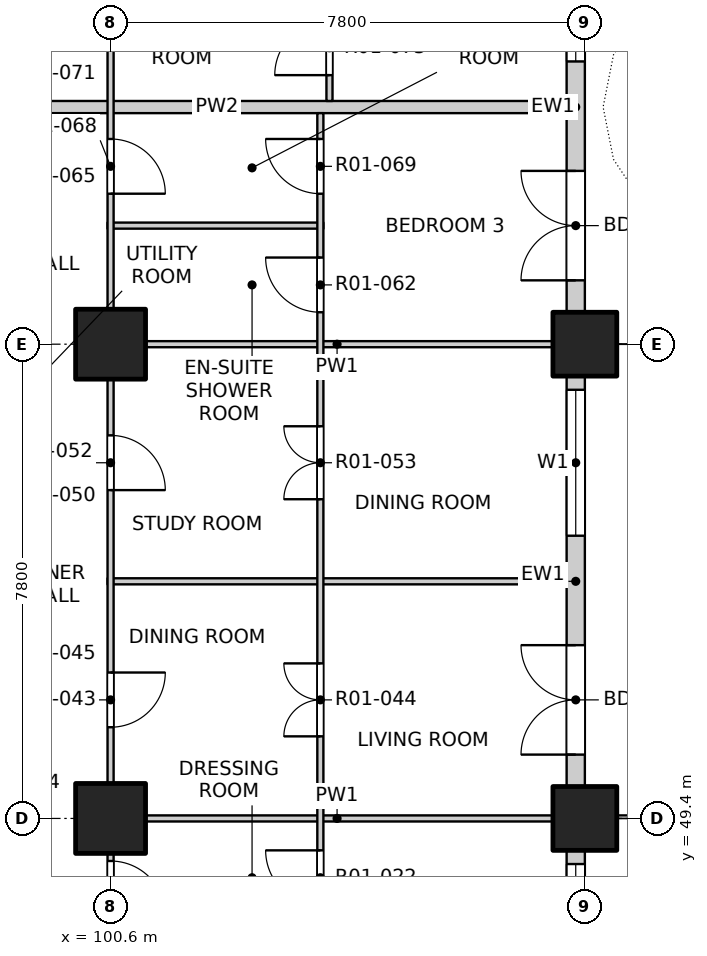
"""IFC4 building model, lengths in metres.
Left out: names, types, materials, properties, quantities, classifications, styles, units other than length and angle.
Written with IfcOpenShell. Run it as: python <this file> out.ifc"""

import sys

from ifc_helpers import new_model, si_unit, direction, frame, frame_2d, origin, origin_2d, place, context, subcontext, project, spatial, rectangle, extrude, element, fill, save


model = new_model("IFC4")
c1 = context("Model", 3, precision=1e-05, world=origin(), true_north=direction((0.0, 1.0)))
c2 = subcontext(c1, "Body", "Model", "MODEL_VIEW")
j1 = project(units=[si_unit("LENGTHUNIT", "METRE"), si_unit("PLANEANGLEUNIT", "RADIAN")], contexts=[c1])
p1 = place(None, origin())
s1 = spatial("IfcSite", under=j1, at=p1, CompositionType="ELEMENT")
p2 = place(p1, origin())
s2 = spatial("IfcBuilding", under=s1, at=p2, CompositionType="ELEMENT")
p3 = place(p2, frame((0.0, 0.0, 26.3)))
s3 = spatial("IfcBuildingStorey", under=s2, at=p3, CompositionType="ELEMENT", Elevation=26.3)
for number, where, z_axis, x_axis in (
    (1, (108.4, 49.4, -0.25), (0.0, 0.0, 1.0), (1.0, 0.0, 0.0)),
    (2, (108.4, 57.2, -0.25), (0.0, 0.0, 1.0), (1.0, 0.0, 0.0)),
):
    element("IfcColumn", number, at=place(p3, frame(where, z_axis=z_axis, x_axis=x_axis)), inside=s3, PredefinedType="COLUMN", context=c2, shape_type="SweptSolid", body=[
        extrude(rectangle(XDim=1.05, YDim=1.05, at=origin_2d()), origin(), (0.0, 0.0, 1.0), 3.4),
    ])
for number, where, z_axis, x_axis in (
    (3, (100.6, 49.4, -0.25), (0.0, 0.0, 1.0), (1.0, 0.0, 0.0)),
    (4, (100.6, 57.2, -0.25), (0.0, 0.0, 1.0), (1.0, 0.0, 0.0)),
):
    element("IfcColumn", number, at=place(p3, frame(where, z_axis=z_axis, x_axis=x_axis)), inside=s3, PredefinedType="COLUMN", context=c2, shape_type="SweptSolid", body=[
        extrude(rectangle(XDim=1.15, YDim=1.15, at=origin_2d()), origin(), (0.0, 0.0, 1.0), 3.4),
    ])
p4 = place(p3, frame((108.25, 45.5, 0.0), z_axis=(0.0, 0.0, 1.0), x_axis=(0.0, 1.0, 0.0)))
e5 = element("IfcWall", 5, at=p4, inside=s3, PredefinedType="SOLIDWALL", context=c2, shape_type="SweptSolid", body=[
    extrude(rectangle(XDim=3.375, YDim=0.3, at=frame_2d((1.688, 0.0))), origin(), (0.0, 0.0, 1.0), 2.7),
])
p5 = place(p4, frame((0.75, 0.0, 0.9)))
e6 = element("IfcOpeningElement", 6, at=p5, cuts=e5, PredefinedType="OPENING", context=c2, shape_type="SweptSolid", body=[
    extrude(rectangle(XDim=2.4, YDim=1.8, at=frame_2d((1.2, 0.9))), frame((0.0, 0.16, 0.0), z_axis=(0.0, -1.0, 0.0), x_axis=(1.0, 0.0, 0.0)), (0.0, 0.0, 1.0), 0.32),
])
p6 = place(p3, frame((108.25, 49.925, 0.0), z_axis=(0.0, 0.0, 1.0), x_axis=(0.0, 1.0, 0.0)))
e7 = element("IfcWall", 7, at=p6, inside=s3, PredefinedType="SOLIDWALL", context=c2, shape_type="SweptSolid", body=[
    extrude(rectangle(XDim=6.75, YDim=0.3, at=frame_2d((3.375, 0.0))), origin(), (0.0, 0.0, 1.0), 2.7),
])
p7 = place(p6, frame((0.525, 0.0, 0.0)))
e8 = element("IfcOpeningElement", 8, at=p7, cuts=e7, PredefinedType="OPENING", context=c2, shape_type="SweptSolid", body=[
    extrude(rectangle(XDim=1.8, YDim=2.4, at=frame_2d((0.9, 1.2))), frame((0.0, 0.16, 0.0), z_axis=(0.0, -1.0, 0.0), x_axis=(1.0, 0.0, 0.0)), (0.0, 0.0, 1.0), 0.32),
])
p8 = place(p6, frame((4.125, 0.0, 0.9)))
e9 = element("IfcOpeningElement", 9, at=p8, cuts=e7, PredefinedType="OPENING", context=c2, shape_type="SweptSolid", body=[
    extrude(rectangle(XDim=2.4, YDim=1.8, at=frame_2d((1.2, 0.9))), frame((0.0, 0.16, 0.0), z_axis=(0.0, -1.0, 0.0), x_axis=(1.0, 0.0, 0.0)), (0.0, 0.0, 1.0), 0.32),
])
p9 = place(p3, frame((108.25, 57.725, 0.0), z_axis=(0.0, 0.0, 1.0), x_axis=(0.0, 1.0, 0.0)))
e10 = element("IfcWall", 10, at=p9, inside=s3, PredefinedType="SOLIDWALL", context=c2, shape_type="SweptSolid", body=[
    extrude(rectangle(XDim=6.75, YDim=0.3, at=frame_2d((3.375, 0.0))), origin(), (0.0, 0.0, 1.0), 2.7),
])
p10 = place(p9, frame((0.525, 0.0, 0.0)))
e11 = element("IfcOpeningElement", 11, at=p10, cuts=e10, PredefinedType="OPENING", context=c2, shape_type="SweptSolid", body=[
    extrude(rectangle(XDim=1.8, YDim=2.4, at=frame_2d((0.9, 1.2))), frame((0.0, 0.16, 0.0), z_axis=(0.0, -1.0, 0.0), x_axis=(1.0, 0.0, 0.0)), (0.0, 0.0, 1.0), 0.32),
])
p11 = place(p9, frame((4.125, 0.0, 0.9)))
e12 = element("IfcOpeningElement", 12, at=p11, cuts=e10, PredefinedType="OPENING", context=c2, shape_type="SweptSolid", body=[
    extrude(rectangle(XDim=2.4, YDim=1.8, at=frame_2d((1.2, 0.9))), frame((0.0, 0.16, 0.0), z_axis=(0.0, -1.0, 0.0), x_axis=(1.0, 0.0, 0.0)), (0.0, 0.0, 1.0), 0.32),
])
p12 = place(p3, frame((100.55, 49.4, 0.0), z_axis=(0.0, 0.0, 1.0), x_axis=(1.0, 0.0, 0.0)))
e13 = element("IfcWall", 13, at=p12, inside=s3, PredefinedType="PARTITIONING", context=c2, shape_type="SweptSolid", body=[
    extrude(rectangle(XDim=7.55, YDim=0.1, at=frame_2d((3.775, 0.0))), origin(), (0.0, 0.0, 1.0), 2.55),
])
p13 = place(p3, frame((100.55, 53.3, 0.0), z_axis=(0.0, 0.0, 1.0), x_axis=(1.0, 0.0, 0.0)))
e14 = element("IfcWall", 14, at=p13, inside=s3, PredefinedType="PARTITIONING", context=c2, shape_type="SweptSolid", body=[
    extrude(rectangle(XDim=7.55, YDim=0.1, at=frame_2d((3.775, 0.0))), origin(), (0.0, 0.0, 1.0), 3.15),
])
p14 = place(p3, frame((100.55, 57.2, 0.0), z_axis=(0.0, 0.0, 1.0), x_axis=(1.0, 0.0, 0.0)))
e15 = element("IfcWall", 15, at=p14, inside=s3, PredefinedType="PARTITIONING", context=c2, shape_type="SweptSolid", body=[
    extrude(rectangle(XDim=7.55, YDim=0.1, at=frame_2d((3.775, 0.0))), origin(), (0.0, 0.0, 1.0), 2.55),
])
p15 = place(p3, frame((100.55, 59.15, 0.0), z_axis=(0.0, 0.0, 1.0), x_axis=(1.0, 0.0, 0.0)))
e16 = element("IfcWall", 16, at=p15, inside=s3, PredefinedType="PARTITIONING", context=c2, shape_type="SweptSolid", body=[
    extrude(rectangle(XDim=3.55, YDim=0.1, at=frame_2d((1.775, 0.0))), origin(), (0.0, 0.0, 1.0), 3.15),
])
p16 = place(p3, frame((96.6, 61.1, 0.0), z_axis=(0.0, 0.0, 1.0), x_axis=(1.0, 0.0, 0.0)))
e17 = element("IfcWall", 17, at=p16, inside=s3, PredefinedType="PARTITIONING", context=c2, shape_type="SweptSolid", body=[
    extrude(rectangle(XDim=11.5, YDim=0.2, at=frame_2d((5.75, 0.0))), origin(), (0.0, 0.0, 1.0), 3.15),
])
p17 = place(p3, frame((100.6, 41.9, 0.0), z_axis=(0.0, 0.0, 1.0), x_axis=(0.0, 1.0, 0.0)))
e18 = element("IfcWall", 18, at=p17, inside=s3, PredefinedType="PARTITIONING", context=c2, shape_type="SweptSolid", body=[
    extrude(rectangle(XDim=7.5, YDim=0.1, at=frame_2d((3.75, 0.0))), origin(), (0.0, 0.0, 1.0), 2.55),
])
p18 = place(p17, frame((1.2, 0.0, 0.0)))
e19 = element("IfcOpeningElement", 19, at=p18, cuts=e18, PredefinedType="OPENING", context=c2, shape_type="SweptSolid", body=[
    extrude(rectangle(XDim=0.9, YDim=2.1, at=frame_2d((0.45, 1.05))), frame((0.0, 0.06, 0.0), z_axis=(0.0, -1.0, 0.0), x_axis=(1.0, 0.0, 0.0)), (0.0, 0.0, 1.0), 0.12),
])
p19 = place(p17, frame((5.9, 0.0, 0.0)))
e20 = element("IfcOpeningElement", 20, at=p19, cuts=e18, PredefinedType="OPENING", context=c2, shape_type="SweptSolid", body=[
    extrude(rectangle(XDim=0.9, YDim=2.1, at=frame_2d((0.45, 1.05))), frame((0.0, 0.06, 0.0), z_axis=(0.0, -1.0, 0.0), x_axis=(1.0, 0.0, 0.0)), (0.0, 0.0, 1.0), 0.12),
])
p20 = place(p3, frame((100.6, 49.4, 0.0), z_axis=(0.0, 0.0, 1.0), x_axis=(0.0, 1.0, 0.0)))
e21 = element("IfcWall", 21, at=p20, inside=s3, PredefinedType="PARTITIONING", context=c2, shape_type="SweptSolid", body=[
    extrude(rectangle(XDim=31.2, YDim=0.1, at=frame_2d((15.6, 0.0))), origin(), (0.0, 0.0, 1.0), 3.15),
])
p21 = place(p20, frame((1.5, 0.0, 0.0)))
e22 = element("IfcOpeningElement", 22, at=p21, cuts=e21, PredefinedType="OPENING", context=c2, shape_type="SweptSolid", body=[
    extrude(rectangle(XDim=0.9, YDim=2.1, at=frame_2d((0.45, 1.05))), frame((0.0, 0.06, 0.0), z_axis=(0.0, -1.0, 0.0), x_axis=(1.0, 0.0, 0.0)), (0.0, 0.0, 1.0), 0.12),
])
p22 = place(p20, frame((5.4, 0.0, 0.0)))
e23 = element("IfcOpeningElement", 23, at=p22, cuts=e21, PredefinedType="OPENING", context=c2, shape_type="SweptSolid", body=[
    extrude(rectangle(XDim=0.9, YDim=2.1, at=frame_2d((0.45, 1.05))), frame((0.0, 0.06, 0.0), z_axis=(0.0, -1.0, 0.0), x_axis=(1.0, 0.0, 0.0)), (0.0, 0.0, 1.0), 0.12),
])
p23 = place(p20, frame((10.275, 0.0, 0.0)))
e24 = element("IfcOpeningElement", 24, at=p23, cuts=e21, PredefinedType="OPENING", context=c2, shape_type="SweptSolid", body=[
    extrude(rectangle(XDim=0.9, YDim=2.1, at=frame_2d((0.45, 1.05))), frame((0.0, 0.06, 0.0), z_axis=(0.0, -1.0, 0.0), x_axis=(1.0, 0.0, 0.0)), (0.0, 0.0, 1.0), 0.12),
])
p24 = place(p20, frame((14.0, 0.0, 0.0)))
e25 = element("IfcOpeningElement", 25, at=p24, cuts=e21, PredefinedType="OPENING", context=c2, shape_type="SweptSolid", body=[
    extrude(rectangle(XDim=0.9, YDim=2.1, at=frame_2d((0.45, 1.05))), frame((0.0, 0.06, 0.0), z_axis=(0.0, -1.0, 0.0), x_axis=(1.0, 0.0, 0.0)), (0.0, 0.0, 1.0), 0.12),
])
p25 = place(p20, frame((17.1, 0.0, 0.0)))
e26 = element("IfcOpeningElement", 26, at=p25, cuts=e21, PredefinedType="OPENING", context=c2, shape_type="SweptSolid", body=[
    extrude(rectangle(XDim=0.9, YDim=2.1, at=frame_2d((0.45, 1.05))), frame((0.0, 0.06, 0.0), z_axis=(0.0, -1.0, 0.0), x_axis=(1.0, 0.0, 0.0)), (0.0, 0.0, 1.0), 0.12),
])
p26 = place(p20, frame((21.8, 0.0, 0.0)))
e27 = element("IfcOpeningElement", 27, at=p26, cuts=e21, PredefinedType="OPENING", context=c2, shape_type="SweptSolid", body=[
    extrude(rectangle(XDim=0.9, YDim=2.1, at=frame_2d((0.45, 1.05))), frame((0.0, 0.06, 0.0), z_axis=(0.0, -1.0, 0.0), x_axis=(1.0, 0.0, 0.0)), (0.0, 0.0, 1.0), 0.12),
])
p27 = place(p20, frame((24.9, 0.0, 0.0)))
e28 = element("IfcOpeningElement", 28, at=p27, cuts=e21, PredefinedType="OPENING", context=c2, shape_type="SweptSolid", body=[
    extrude(rectangle(XDim=0.9, YDim=2.1, at=frame_2d((0.45, 1.05))), frame((0.0, 0.06, 0.0), z_axis=(0.0, -1.0, 0.0), x_axis=(1.0, 0.0, 0.0)), (0.0, 0.0, 1.0), 0.12),
])
p28 = place(p20, frame((28.8, 0.0, 0.0)))
e29 = element("IfcOpeningElement", 29, at=p28, cuts=e21, PredefinedType="OPENING", context=c2, shape_type="SweptSolid", body=[
    extrude(rectangle(XDim=0.9, YDim=2.1, at=frame_2d((0.45, 1.05))), frame((0.0, 0.06, 0.0), z_axis=(0.0, -1.0, 0.0), x_axis=(1.0, 0.0, 0.0)), (0.0, 0.0, 1.0), 0.12),
])
p29 = place(p3, frame((104.05, 41.9, 0.0), z_axis=(0.0, 0.0, 1.0), x_axis=(0.0, 1.0, 0.0)))
e30 = element("IfcWall", 30, at=p29, inside=s3, PredefinedType="PARTITIONING", context=c2, shape_type="SweptSolid", body=[
    extrude(rectangle(XDim=19.1, YDim=0.1, at=frame_2d((9.55, 0.0))), origin(), (0.0, 0.0, 1.0), 3.15),
])
p30 = place(p29, frame((1.05, 0.0, 0.0)))
e31 = element("IfcOpeningElement", 31, at=p30, cuts=e30, PredefinedType="OPENING", context=c2, shape_type="SweptSolid", body=[
    extrude(rectangle(XDim=1.2, YDim=2.1, at=frame_2d((0.6, 1.05))), frame((0.0, 0.06, 0.0), z_axis=(0.0, -1.0, 0.0), x_axis=(1.0, 0.0, 0.0)), (0.0, 0.0, 1.0), 0.12),
])
p31 = place(p29, frame((4.125, 0.0, 0.0)))
e32 = element("IfcOpeningElement", 32, at=p31, cuts=e30, PredefinedType="OPENING", context=c2, shape_type="SweptSolid", body=[
    extrude(rectangle(XDim=0.9, YDim=2.1, at=frame_2d((0.45, 1.05))), frame((0.0, 0.06, 0.0), z_axis=(0.0, -1.0, 0.0), x_axis=(1.0, 0.0, 0.0)), (0.0, 0.0, 1.0), 0.12),
])
p32 = place(p29, frame((6.075, 0.0, 0.0)))
e33 = element("IfcOpeningElement", 33, at=p32, cuts=e30, PredefinedType="OPENING", context=c2, shape_type="SweptSolid", body=[
    extrude(rectangle(XDim=0.9, YDim=2.1, at=frame_2d((0.45, 1.05))), frame((0.0, 0.06, 0.0), z_axis=(0.0, -1.0, 0.0), x_axis=(1.0, 0.0, 0.0)), (0.0, 0.0, 1.0), 0.12),
])
p33 = place(p29, frame((8.85, 0.0, 0.0)))
e34 = element("IfcOpeningElement", 34, at=p33, cuts=e30, PredefinedType="OPENING", context=c2, shape_type="SweptSolid", body=[
    extrude(rectangle(XDim=1.2, YDim=2.1, at=frame_2d((0.6, 1.05))), frame((0.0, 0.06, 0.0), z_axis=(0.0, -1.0, 0.0), x_axis=(1.0, 0.0, 0.0)), (0.0, 0.0, 1.0), 0.12),
])
p34 = place(p29, frame((12.75, 0.0, 0.0)))
e35 = element("IfcOpeningElement", 35, at=p34, cuts=e30, PredefinedType="OPENING", context=c2, shape_type="SweptSolid", body=[
    extrude(rectangle(XDim=1.2, YDim=2.1, at=frame_2d((0.6, 1.05))), frame((0.0, 0.06, 0.0), z_axis=(0.0, -1.0, 0.0), x_axis=(1.0, 0.0, 0.0)), (0.0, 0.0, 1.0), 0.12),
])
p35 = place(p29, frame((15.825, 0.0, 0.0)))
e36 = element("IfcOpeningElement", 36, at=p35, cuts=e30, PredefinedType="OPENING", context=c2, shape_type="SweptSolid", body=[
    extrude(rectangle(XDim=0.9, YDim=2.1, at=frame_2d((0.45, 1.05))), frame((0.0, 0.06, 0.0), z_axis=(0.0, -1.0, 0.0), x_axis=(1.0, 0.0, 0.0)), (0.0, 0.0, 1.0), 0.12),
])
p36 = place(p29, frame((17.775, 0.0, 0.0)))
e37 = element("IfcOpeningElement", 37, at=p36, cuts=e30, PredefinedType="OPENING", context=c2, shape_type="SweptSolid", body=[
    extrude(rectangle(XDim=0.9, YDim=2.1, at=frame_2d((0.45, 1.05))), frame((0.0, 0.06, 0.0), z_axis=(0.0, -1.0, 0.0), x_axis=(1.0, 0.0, 0.0)), (0.0, 0.0, 1.0), 0.12),
])
p37 = place(p3, frame((104.2, 61.2, 0.0), z_axis=(0.0, 0.0, 1.0), x_axis=(0.0, 1.0, 0.0)))
e38 = element("IfcWall", 38, at=p37, inside=s3, PredefinedType="PARTITIONING", context=c2, shape_type="SweptSolid", body=[
    extrude(rectangle(XDim=15.4, YDim=0.1, at=frame_2d((7.7, 0.0))), origin(), (0.0, 0.0, 1.0), 3.15),
])
p38 = place(p37, frame((0.425, 0.0, 0.0)))
e39 = element("IfcOpeningElement", 39, at=p38, cuts=e38, PredefinedType="OPENING", context=c2, shape_type="SweptSolid", body=[
    extrude(rectangle(XDim=0.9, YDim=2.1, at=frame_2d((0.45, 1.05))), frame((0.0, 0.06, 0.0), z_axis=(0.0, -1.0, 0.0), x_axis=(1.0, 0.0, 0.0)), (0.0, 0.0, 1.0), 0.12),
])
p39 = place(p37, frame((2.375, 0.0, 0.0)))
e40 = element("IfcOpeningElement", 40, at=p39, cuts=e38, PredefinedType="OPENING", context=c2, shape_type="SweptSolid", body=[
    extrude(rectangle(XDim=0.9, YDim=2.1, at=frame_2d((0.45, 1.05))), frame((0.0, 0.06, 0.0), z_axis=(0.0, -1.0, 0.0), x_axis=(1.0, 0.0, 0.0)), (0.0, 0.0, 1.0), 0.12),
])
p40 = place(p37, frame((5.15, 0.0, 0.0)))
e41 = element("IfcOpeningElement", 41, at=p40, cuts=e38, PredefinedType="OPENING", context=c2, shape_type="SweptSolid", body=[
    extrude(rectangle(XDim=1.2, YDim=2.1, at=frame_2d((0.6, 1.05))), frame((0.0, 0.06, 0.0), z_axis=(0.0, -1.0, 0.0), x_axis=(1.0, 0.0, 0.0)), (0.0, 0.0, 1.0), 0.12),
])
p41 = place(p37, frame((8.225, 0.0, 0.0)))
e42 = element("IfcOpeningElement", 42, at=p41, cuts=e38, PredefinedType="OPENING", context=c2, shape_type="SweptSolid", body=[
    extrude(rectangle(XDim=0.9, YDim=2.1, at=frame_2d((0.45, 1.05))), frame((0.0, 0.06, 0.0), z_axis=(0.0, -1.0, 0.0), x_axis=(1.0, 0.0, 0.0)), (0.0, 0.0, 1.0), 0.12),
])
p42 = place(p37, frame((10.175, 0.0, 0.0)))
e43 = element("IfcOpeningElement", 43, at=p42, cuts=e38, PredefinedType="OPENING", context=c2, shape_type="SweptSolid", body=[
    extrude(rectangle(XDim=0.9, YDim=2.1, at=frame_2d((0.45, 1.05))), frame((0.0, 0.06, 0.0), z_axis=(0.0, -1.0, 0.0), x_axis=(1.0, 0.0, 0.0)), (0.0, 0.0, 1.0), 0.12),
])
p43 = place(p37, frame((12.95, 0.0, 0.0)))
e44 = element("IfcOpeningElement", 44, at=p43, cuts=e38, PredefinedType="OPENING", context=c2, shape_type="SweptSolid", body=[
    extrude(rectangle(XDim=1.2, YDim=2.1, at=frame_2d((0.6, 1.05))), frame((0.0, 0.06, 0.0), z_axis=(0.0, -1.0, 0.0), x_axis=(1.0, 0.0, 0.0)), (0.0, 0.0, 1.0), 0.12),
])
p44 = place(p5, origin())
e45 = element("IfcWindow", 45, at=p44, inside=s3, PartitioningType="DOUBLE_PANEL_VERTICAL", PredefinedType="WINDOW", context=c2, shape_type="SweptSolid", body=[
    extrude(rectangle(XDim=2.4, YDim=1.8, at=frame_2d((1.2, 0.9))), frame((0.0, 0.03, 0.0), z_axis=(0.0, -1.0, 0.0), x_axis=(1.0, 0.0, 0.0)), (0.0, 0.0, 1.0), 0.06),
])
fill(e6, e45)
p45 = place(p7, origin())
e46 = element("IfcDoor", 46, at=p45, inside=s3, OperationType="DOUBLE_DOOR_SINGLE_SWING", PredefinedType="DOOR", context=c2, shape_type="SweptSolid", body=[
    extrude(rectangle(XDim=1.8, YDim=2.4, at=frame_2d((0.9, 1.2))), frame((0.0, 0.025, 0.0), z_axis=(0.0, -1.0, 0.0), x_axis=(1.0, 0.0, 0.0)), (0.0, 0.0, 1.0), 0.05),
])
fill(e8, e46)
p46 = place(p8, origin())
e47 = element("IfcWindow", 47, at=p46, inside=s3, PartitioningType="DOUBLE_PANEL_VERTICAL", PredefinedType="WINDOW", context=c2, shape_type="SweptSolid", body=[
    extrude(rectangle(XDim=2.4, YDim=1.8, at=frame_2d((1.2, 0.9))), frame((0.0, 0.03, 0.0), z_axis=(0.0, -1.0, 0.0), x_axis=(1.0, 0.0, 0.0)), (0.0, 0.0, 1.0), 0.06),
])
fill(e9, e47)
p47 = place(p10, origin())
e48 = element("IfcDoor", 48, at=p47, inside=s3, OperationType="DOUBLE_DOOR_SINGLE_SWING", PredefinedType="DOOR", context=c2, shape_type="SweptSolid", body=[
    extrude(rectangle(XDim=1.8, YDim=2.4, at=frame_2d((0.9, 1.2))), frame((0.0, 0.025, 0.0), z_axis=(0.0, -1.0, 0.0), x_axis=(1.0, 0.0, 0.0)), (0.0, 0.0, 1.0), 0.05),
])
fill(e11, e48)
p48 = place(p11, origin())
e49 = element("IfcWindow", 49, at=p48, inside=s3, PartitioningType="DOUBLE_PANEL_VERTICAL", PredefinedType="WINDOW", context=c2, shape_type="SweptSolid", body=[
    extrude(rectangle(XDim=2.4, YDim=1.8, at=frame_2d((1.2, 0.9))), frame((0.0, 0.03, 0.0), z_axis=(0.0, -1.0, 0.0), x_axis=(1.0, 0.0, 0.0)), (0.0, 0.0, 1.0), 0.06),
])
fill(e12, e49)
p49 = place(p19, origin())
e50 = element("IfcDoor", 50, at=p49, inside=s3, OperationType="SINGLE_SWING_RIGHT", PredefinedType="DOOR", context=c2, shape_type="SweptSolid", body=[
    extrude(rectangle(XDim=0.9, YDim=2.1, at=frame_2d((0.45, 1.05))), frame((0.0, 0.025, 0.0), z_axis=(0.0, -1.0, 0.0), x_axis=(1.0, 0.0, 0.0)), (0.0, 0.0, 1.0), 0.05),
])
fill(e20, e50)
p50 = place(p32, origin())
e51 = element("IfcDoor", 51, at=p50, inside=s3, OperationType="SINGLE_SWING_RIGHT", PredefinedType="DOOR", context=c2, shape_type="SweptSolid", body=[
    extrude(rectangle(XDim=0.9, YDim=2.1, at=frame_2d((0.45, 1.05))), frame((0.0, 0.025, 0.0), z_axis=(0.0, -1.0, 0.0), x_axis=(1.0, 0.0, 0.0)), (0.0, 0.0, 1.0), 0.05),
])
fill(e33, e51)
p51 = place(p21, origin())
e52 = element("IfcDoor", 52, at=p51, inside=s3, OperationType="SINGLE_SWING_LEFT", PredefinedType="DOOR", context=c2, shape_type="SweptSolid", body=[
    extrude(rectangle(XDim=0.9, YDim=2.1, at=frame_2d((0.45, 1.05))), frame((0.0, 0.025, 0.0), z_axis=(0.0, -1.0, 0.0), x_axis=(1.0, 0.0, 0.0)), (0.0, 0.0, 1.0), 0.05),
])
fill(e22, e52)
p52 = place(p33, origin())
e53 = element("IfcDoor", 53, at=p52, inside=s3, OperationType="DOUBLE_DOOR_SINGLE_SWING", PredefinedType="DOOR", context=c2, shape_type="SweptSolid", body=[
    extrude(rectangle(XDim=1.2, YDim=2.1, at=frame_2d((0.6, 1.05))), frame((0.0, 0.025, 0.0), z_axis=(0.0, -1.0, 0.0), x_axis=(1.0, 0.0, 0.0)), (0.0, 0.0, 1.0), 0.05),
])
fill(e34, e53)
p53 = place(p22, origin())
e54 = element("IfcDoor", 54, at=p53, inside=s3, OperationType="SINGLE_SWING_RIGHT", PredefinedType="DOOR", context=c2, shape_type="SweptSolid", body=[
    extrude(rectangle(XDim=0.9, YDim=2.1, at=frame_2d((0.45, 1.05))), frame((0.0, 0.025, 0.0), z_axis=(0.0, -1.0, 0.0), x_axis=(1.0, 0.0, 0.0)), (0.0, 0.0, 1.0), 0.05),
])
fill(e23, e54)
p54 = place(p34, origin())
e55 = element("IfcDoor", 55, at=p54, inside=s3, OperationType="DOUBLE_DOOR_SINGLE_SWING", PredefinedType="DOOR", context=c2, shape_type="SweptSolid", body=[
    extrude(rectangle(XDim=1.2, YDim=2.1, at=frame_2d((0.6, 1.05))), frame((0.0, 0.025, 0.0), z_axis=(0.0, -1.0, 0.0), x_axis=(1.0, 0.0, 0.0)), (0.0, 0.0, 1.0), 0.05),
])
fill(e35, e55)
p55 = place(p35, origin())
e56 = element("IfcDoor", 56, at=p55, inside=s3, OperationType="SINGLE_SWING_RIGHT", PredefinedType="DOOR", context=c2, shape_type="SweptSolid", body=[
    extrude(rectangle(XDim=0.9, YDim=2.1, at=frame_2d((0.45, 1.05))), frame((0.0, 0.025, 0.0), z_axis=(0.0, -1.0, 0.0), x_axis=(1.0, 0.0, 0.0)), (0.0, 0.0, 1.0), 0.05),
])
fill(e36, e56)
p56 = place(p23, origin())
e57 = element("IfcDoor", 57, at=p56, inside=s3, OperationType="SINGLE_SWING_RIGHT", PredefinedType="DOOR", context=c2, shape_type="SweptSolid", body=[
    extrude(rectangle(XDim=0.9, YDim=2.1, at=frame_2d((0.45, 1.05))), frame((0.0, 0.025, 0.0), z_axis=(0.0, -1.0, 0.0), x_axis=(1.0, 0.0, 0.0)), (0.0, 0.0, 1.0), 0.05),
])
fill(e24, e57)
p57 = place(p36, origin())
e58 = element("IfcDoor", 58, at=p57, inside=s3, OperationType="SINGLE_SWING_RIGHT", PredefinedType="DOOR", context=c2, shape_type="SweptSolid", body=[
    extrude(rectangle(XDim=0.9, YDim=2.1, at=frame_2d((0.45, 1.05))), frame((0.0, 0.025, 0.0), z_axis=(0.0, -1.0, 0.0), x_axis=(1.0, 0.0, 0.0)), (0.0, 0.0, 1.0), 0.05),
])
fill(e37, e58)
p58 = place(p38, origin())
e59 = element("IfcDoor", 59, at=p58, inside=s3, OperationType="SINGLE_SWING_LEFT", PredefinedType="DOOR", context=c2, shape_type="SweptSolid", body=[
    extrude(rectangle(XDim=0.9, YDim=2.1, at=frame_2d((0.45, 1.05))), frame((0.0, 0.025, 0.0), z_axis=(0.0, -1.0, 0.0), x_axis=(1.0, 0.0, 0.0)), (0.0, 0.0, 1.0), 0.05),
])
fill(e39, e59)
save(model, sys.argv[1])
